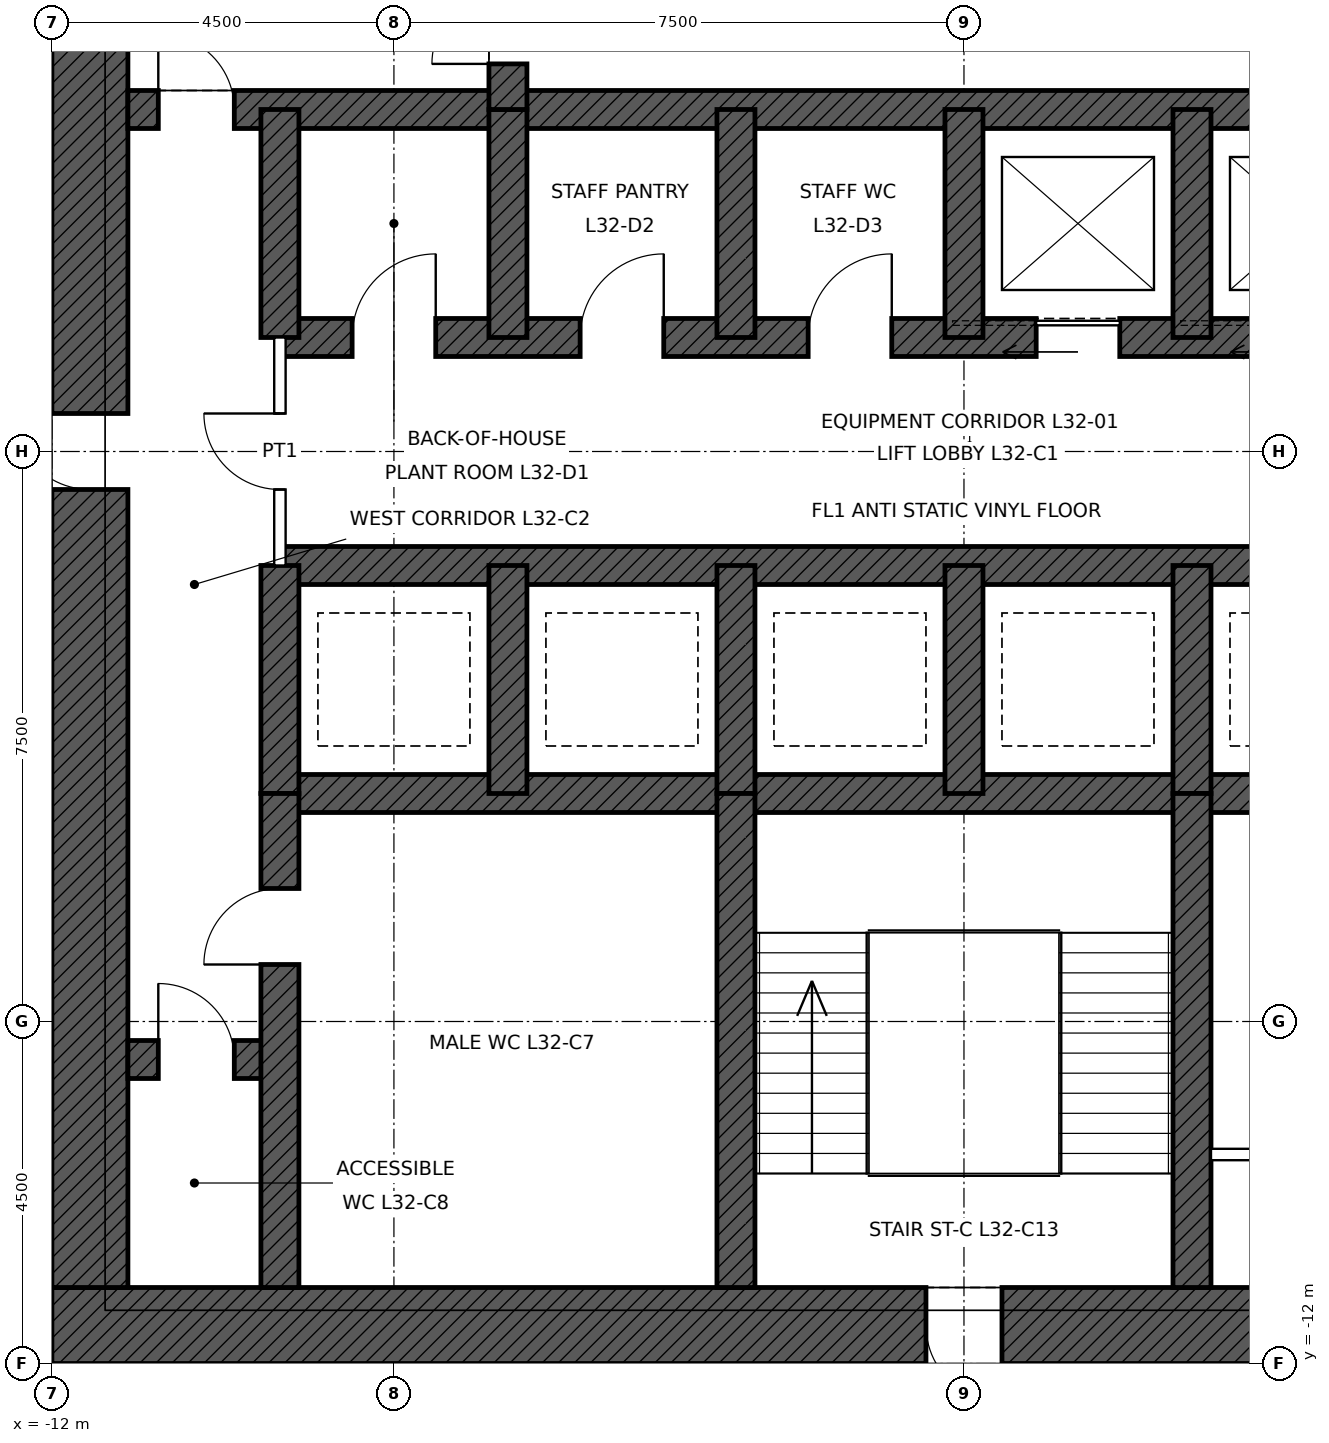
"""IFC4 building model, lengths in metres.
Left out: names, types, materials, properties, quantities, classifications, styles, units other than length and angle.
Written with IfcOpenShell. Run it as: python <this file> out.ifc"""

import sys

from ifc_helpers import new_model, si_unit, direction, frame, frame_2d, origin, place, context, subcontext, project, spatial, rectangle, extrude, element, fill, save


model = new_model("IFC4")
c1 = context("Model", 3, precision=1e-05, world=origin(), true_north=direction((0.0, 1.0)))
c2 = subcontext(c1, "Body", "Model", "MODEL_VIEW")
j1 = project(units=[si_unit("LENGTHUNIT", "METRE"), si_unit("PLANEANGLEUNIT", "RADIAN")], contexts=[c1])
p1 = place(None, origin())
s1 = spatial("IfcSite", under=j1, at=p1, CompositionType="ELEMENT")
p2 = place(p1, origin())
s2 = spatial("IfcBuilding", under=s1, at=p2, CompositionType="ELEMENT")
p3 = place(p2, frame((0.0, 0.0, 158.4)))
s3 = spatial("IfcBuildingStorey", under=s2, at=p3, CompositionType="ELEMENT", Elevation=158.4)
p4 = place(p3, frame((12.0, -11.5, 0.0), z_axis=(0.0, 0.0, 1.0), x_axis=(-1.0, 0.0, 0.0)))
e1 = element("IfcWall", 1, at=p4, inside=s3, PredefinedType="SHEAR", context=c2, shape_type="SweptSolid", body=[
    extrude(rectangle(XDim=24.0, YDim=1.0, at=frame_2d((12.0, 0.0))), origin(), (0.0, 0.0, 1.0), 4.5),
])
p5 = place(p4, frame((11.5, 0.0, 0.0)))
e2 = element("IfcOpeningElement", 2, at=p5, cuts=e1, PredefinedType="OPENING", context=c2, shape_type="SweptSolid", body=[
    extrude(rectangle(XDim=1.0, YDim=2.1, at=frame_2d((0.5, 1.05))), frame((0.0, 0.51, 0.0), z_axis=(0.0, -1.0, 0.0), x_axis=(1.0, 0.0, 0.0)), (0.0, 0.0, 1.0), 1.02),
])
p6 = place(p4, frame((1.0, 0.0, 0.0)))
e3 = element("IfcOpeningElement", 3, at=p6, cuts=e1, PredefinedType="OPENING", context=c2, shape_type="SweptSolid", body=[
    extrude(rectangle(XDim=1.0, YDim=2.4, at=frame_2d((0.5, 1.2))), frame((0.0, 0.51, 0.0), z_axis=(0.0, -1.0, 0.0), x_axis=(1.0, 0.0, 0.0)), (0.0, 0.0, 1.0), 1.02),
])
p7 = place(p3, frame((-11.5, -11.0, 0.0), z_axis=(0.0, 0.0, 1.0), x_axis=(0.0, 1.0, 0.0)))
e4 = element("IfcWall", 4, at=p7, inside=s3, PredefinedType="SHEAR", context=c2, shape_type="SweptSolid", body=[
    extrude(rectangle(XDim=22.0, YDim=1.0, at=frame_2d((11.0, 0.0))), origin(), (0.0, 0.0, 1.0), 4.5),
])
p8 = place(p7, frame((10.5, 0.0, 0.0)))
e5 = element("IfcOpeningElement", 5, at=p8, cuts=e4, PredefinedType="OPENING", context=c2, shape_type="SweptSolid", body=[
    extrude(rectangle(XDim=1.0, YDim=2.4, at=frame_2d((0.5, 1.2))), frame((0.0, 0.51, 0.0), z_axis=(0.0, -1.0, 0.0), x_axis=(1.0, 0.0, 0.0)), (0.0, 0.0, 1.0), 1.02),
])
p9 = place(p3, frame((-11.0, 4.5, 0.0), z_axis=(0.0, 0.0, 1.0), x_axis=(1.0, 0.0, 0.0)))
e6 = element("IfcWall", 6, at=p9, inside=s3, PredefinedType="SHEAR", context=c2, shape_type="SweptSolid", body=[
    extrude(rectangle(XDim=22.0, YDim=0.5, at=frame_2d((11.0, 0.0))), origin(), (0.0, 0.0, 1.0), 4.5),
])
p10 = place(p9, frame((0.4, 0.0, 0.0)))
e7 = element("IfcOpeningElement", 7, at=p10, cuts=e6, PredefinedType="OPENING", context=c2, shape_type="SweptSolid", body=[
    extrude(rectangle(XDim=1.0, YDim=2.1, at=frame_2d((0.5, 1.05))), frame((0.0, 0.26, 0.0), z_axis=(0.0, -1.0, 0.0), x_axis=(1.0, 0.0, 0.0)), (0.0, 0.0, 1.0), 0.52),
])
p11 = place(p9, frame((20.6, 0.0, 0.0)))
e8 = element("IfcOpeningElement", 8, at=p11, cuts=e6, PredefinedType="OPENING", context=c2, shape_type="SweptSolid", body=[
    extrude(rectangle(XDim=1.0, YDim=2.1, at=frame_2d((0.5, 1.05))), frame((0.0, 0.26, 0.0), z_axis=(0.0, -1.0, 0.0), x_axis=(1.0, 0.0, 0.0)), (0.0, 0.0, 1.0), 0.52),
])
p12 = place(p3, frame((-9.0, 1.5, 0.0), z_axis=(0.0, 0.0, 1.0), x_axis=(1.0, 0.0, 0.0)))
e9 = element("IfcWall", 9, at=p12, inside=s3, PredefinedType="SHEAR", context=c2, shape_type="SweptSolid", body=[
    extrude(rectangle(XDim=18.0, YDim=0.5, at=frame_2d((9.0, 0.0))), origin(), (0.0, 0.0, 1.0), 4.5),
])
p13 = place(p12, frame((9.95, 0.0, 0.0)))
e10 = element("IfcOpeningElement", 10, at=p13, cuts=e9, PredefinedType="OPENING", context=c2, shape_type="SweptSolid", body=[
    extrude(rectangle(XDim=1.1, YDim=2.1, at=frame_2d((0.55, 1.05))), frame((0.0, 0.26, 0.0), z_axis=(0.0, -1.0, 0.0), x_axis=(1.0, 0.0, 0.0)), (0.0, 0.0, 1.0), 0.52),
])
p14 = place(p12, frame((12.95, 0.0, 0.0)))
e11 = element("IfcOpeningElement", 11, at=p14, cuts=e9, PredefinedType="OPENING", context=c2, shape_type="SweptSolid", body=[
    extrude(rectangle(XDim=1.1, YDim=2.1, at=frame_2d((0.55, 1.05))), frame((0.0, 0.26, 0.0), z_axis=(0.0, -1.0, 0.0), x_axis=(1.0, 0.0, 0.0)), (0.0, 0.0, 1.0), 0.52),
])
p15 = place(p12, frame((15.95, 0.0, 0.0)))
e12 = element("IfcOpeningElement", 12, at=p15, cuts=e9, PredefinedType="OPENING", context=c2, shape_type="SweptSolid", body=[
    extrude(rectangle(XDim=1.1, YDim=2.1, at=frame_2d((0.55, 1.05))), frame((0.0, 0.26, 0.0), z_axis=(0.0, -1.0, 0.0), x_axis=(1.0, 0.0, 0.0)), (0.0, 0.0, 1.0), 0.52),
])
p16 = place(p12, frame((0.95, 0.0, 0.0)))
e13 = element("IfcOpeningElement", 13, at=p16, cuts=e9, PredefinedType="OPENING", context=c2, shape_type="SweptSolid", body=[
    extrude(rectangle(XDim=1.1, YDim=2.1, at=frame_2d((0.55, 1.05))), frame((0.0, 0.26, 0.0), z_axis=(0.0, -1.0, 0.0), x_axis=(1.0, 0.0, 0.0)), (0.0, 0.0, 1.0), 0.52),
])
p17 = place(p12, frame((3.95, 0.0, 0.0)))
e14 = element("IfcOpeningElement", 14, at=p17, cuts=e9, PredefinedType="OPENING", context=c2, shape_type="SweptSolid", body=[
    extrude(rectangle(XDim=1.1, YDim=2.1, at=frame_2d((0.55, 1.05))), frame((0.0, 0.26, 0.0), z_axis=(0.0, -1.0, 0.0), x_axis=(1.0, 0.0, 0.0)), (0.0, 0.0, 1.0), 0.52),
])
p18 = place(p12, frame((6.95, 0.0, 0.0)))
e15 = element("IfcOpeningElement", 15, at=p18, cuts=e9, PredefinedType="OPENING", context=c2, shape_type="SweptSolid", body=[
    extrude(rectangle(XDim=1.1, YDim=2.1, at=frame_2d((0.55, 1.05))), frame((0.0, 0.26, 0.0), z_axis=(0.0, -1.0, 0.0), x_axis=(1.0, 0.0, 0.0)), (0.0, 0.0, 1.0), 0.52),
])
for number, where, z_axis, x_axis in (
    (16, (-9.0, -1.5, 0.0), (0.0, 0.0, 1.0), (1.0, 0.0, 0.0)),
    (17, (-9.0, -4.5, 0.0), (0.0, 0.0, 1.0), (1.0, 0.0, 0.0)),
):
    element("IfcWall", number, at=place(p3, frame(where, z_axis=z_axis, x_axis=x_axis)), inside=s3, PredefinedType="SHEAR", context=c2, shape_type="SweptSolid", body=[
        extrude(rectangle(XDim=18.0, YDim=0.5, at=frame_2d((9.0, 0.0))), origin(), (0.0, 0.0, 1.0), 4.5),
    ])
p19 = place(p3, frame((-11.0, -8.0, 0.0), z_axis=(0.0, 0.0, 1.0), x_axis=(1.0, 0.0, 0.0)))
e18 = element("IfcWall", 18, at=p19, inside=s3, PredefinedType="SHEAR", context=c2, shape_type="SweptSolid", body=[
    extrude(rectangle(XDim=2.0, YDim=0.5, at=frame_2d((1.0, 0.0))), origin(), (0.0, 0.0, 1.0), 4.5),
])
p20 = place(p19, frame((0.4, 0.0, 0.0)))
e19 = element("IfcOpeningElement", 19, at=p20, cuts=e18, PredefinedType="OPENING", context=c2, shape_type="SweptSolid", body=[
    extrude(rectangle(XDim=1.0, YDim=2.1, at=frame_2d((0.5, 1.05))), frame((0.0, 0.26, 0.0), z_axis=(0.0, -1.0, 0.0), x_axis=(1.0, 0.0, 0.0)), (0.0, 0.0, 1.0), 0.52),
])
for number, where, z_axis, x_axis in (
    (20, (-9.0, 1.5, 0.0), (0.0, 0.0, 1.0), (0.0, 1.0, 0.0)),
    (21, (-9.0, -4.5, 0.0), (0.0, 0.0, 1.0), (0.0, 1.0, 0.0)),
    (22, (-6.0, 1.5, 0.0), (0.0, 0.0, 1.0), (0.0, 1.0, 0.0)),
    (23, (-3.0, 1.5, 0.0), (0.0, 0.0, 1.0), (0.0, 1.0, 0.0)),
    (24, (0.0, 1.5, 0.0), (0.0, 0.0, 1.0), (0.0, 1.0, 0.0)),
    (25, (3.0, 1.5, 0.0), (0.0, 0.0, 1.0), (0.0, 1.0, 0.0)),
    (26, (-6.0, -4.5, 0.0), (0.0, 0.0, 1.0), (0.0, 1.0, 0.0)),
    (27, (-3.0, -4.5, 0.0), (0.0, 0.0, 1.0), (0.0, 1.0, 0.0)),
    (28, (0.0, -4.5, 0.0), (0.0, 0.0, 1.0), (0.0, 1.0, 0.0)),
    (29, (3.0, -4.5, 0.0), (0.0, 0.0, 1.0), (0.0, 1.0, 0.0)),
):
    element("IfcWall", number, at=place(p3, frame(where, z_axis=z_axis, x_axis=x_axis)), inside=s3, PredefinedType="SHEAR", context=c2, shape_type="SweptSolid", body=[
        extrude(rectangle(XDim=3.0, YDim=0.5, at=frame_2d((1.5, 0.0))), origin(), (0.0, 0.0, 1.0), 4.5),
    ])
p21 = place(p3, frame((-6.0, 4.5, 0.0), z_axis=(0.0, 0.0, 1.0), x_axis=(0.0, 1.0, 0.0)))
e30 = element("IfcWall", 30, at=p21, inside=s3, PredefinedType="SHEAR", context=c2, shape_type="SweptSolid", body=[
    extrude(rectangle(XDim=6.5, YDim=0.5, at=frame_2d((3.25, 0.0))), origin(), (0.0, 0.0, 1.0), 4.5),
])
p22 = place(p21, frame((0.6, 0.0, 0.0)))
e31 = element("IfcOpeningElement", 31, at=p22, cuts=e30, PredefinedType="OPENING", context=c2, shape_type="SweptSolid", body=[
    extrude(rectangle(XDim=1.0, YDim=2.1, at=frame_2d((0.5, 1.05))), frame((0.0, 0.26, 0.0), z_axis=(0.0, -1.0, 0.0), x_axis=(1.0, 0.0, 0.0)), (0.0, 0.0, 1.0), 0.52),
])
p23 = place(p3, frame((-9.0, -11.0, 0.0), z_axis=(0.0, 0.0, 1.0), x_axis=(0.0, 1.0, 0.0)))
e32 = element("IfcWall", 32, at=p23, inside=s3, PredefinedType="SHEAR", context=c2, shape_type="SweptSolid", body=[
    extrude(rectangle(XDim=6.5, YDim=0.5, at=frame_2d((3.25, 0.0))), origin(), (0.0, 0.0, 1.0), 4.5),
])
p24 = place(p23, frame((4.25, 0.0, 0.0)))
e33 = element("IfcOpeningElement", 33, at=p24, cuts=e32, PredefinedType="OPENING", context=c2, shape_type="SweptSolid", body=[
    extrude(rectangle(XDim=1.0, YDim=2.1, at=frame_2d((0.5, 1.05))), frame((0.0, 0.26, 0.0), z_axis=(0.0, -1.0, 0.0), x_axis=(1.0, 0.0, 0.0)), (0.0, 0.0, 1.0), 0.52),
])
for number, where, z_axis, x_axis in (
    (34, (-3.0, -11.0, 0.0), (0.0, 0.0, 1.0), (0.0, 1.0, 0.0)),
    (35, (3.0, -11.0, 0.0), (0.0, 0.0, 1.0), (0.0, 1.0, 0.0)),
):
    element("IfcWall", number, at=place(p3, frame(where, z_axis=z_axis, x_axis=x_axis)), inside=s3, PredefinedType="SHEAR", context=c2, shape_type="SweptSolid", body=[
        extrude(rectangle(XDim=6.5, YDim=0.5, at=frame_2d((3.25, 0.0))), origin(), (0.0, 0.0, 1.0), 4.5),
    ])
p25 = place(p3, frame((3.25, -9.25, 0.0), z_axis=(0.0, 0.0, 1.0), x_axis=(1.0, 0.0, 0.0)))
e36 = element("IfcWall", 36, at=p25, inside=s3, PredefinedType="PARTITIONING", context=c2, shape_type="SweptSolid", body=[
    extrude(rectangle(XDim=5.5, YDim=0.15, at=frame_2d((2.75, 0.0))), origin(), (0.0, 0.0, 1.0), 4.25),
])
p26 = place(p25, frame((2.25, 0.0, 0.0)))
e37 = element("IfcOpeningElement", 37, at=p26, cuts=e36, PredefinedType="OPENING", context=c2, shape_type="SweptSolid", body=[
    extrude(rectangle(XDim=1.0, YDim=2.1, at=frame_2d((0.5, 1.05))), frame((0.0, 0.085, 0.0), z_axis=(0.0, -1.0, 0.0), x_axis=(1.0, 0.0, 0.0)), (0.0, 0.0, 1.0), 0.17),
])
p27 = place(p3, frame((-9.0, -1.5, 0.0), z_axis=(0.0, 0.0, 1.0), x_axis=(0.0, 1.0, 0.0)))
e38 = element("IfcWall", 38, at=p27, inside=s3, PredefinedType="PARTITIONING", context=c2, shape_type="SweptSolid", body=[
    extrude(rectangle(XDim=3.0, YDim=0.15, at=frame_2d((1.5, 0.0))), origin(), (0.0, 0.0, 1.0), 4.25),
])
p28 = place(p27, frame((1.0, 0.0, 0.0)))
e39 = element("IfcOpeningElement", 39, at=p28, cuts=e38, PredefinedType="OPENING", context=c2, shape_type="SweptSolid", body=[
    extrude(rectangle(XDim=1.0, YDim=2.4, at=frame_2d((0.5, 1.2))), frame((0.0, 0.085, 0.0), z_axis=(0.0, -1.0, 0.0), x_axis=(1.0, 0.0, 0.0)), (0.0, 0.0, 1.0), 0.17),
])
p29 = place(p10, origin())
e40 = element("IfcDoor", 40, at=p29, inside=s3, OperationType="SINGLE_SWING_LEFT", PredefinedType="DOOR", context=c2, shape_type="SweptSolid", body=[
    extrude(rectangle(XDim=1.0, YDim=2.1, at=frame_2d((0.5, 1.05))), frame((0.0, 0.025, 0.0), z_axis=(0.0, -1.0, 0.0), x_axis=(1.0, 0.0, 0.0)), (0.0, 0.0, 1.0), 0.05),
])
fill(e7, e40)
p30 = place(p22, origin())
e41 = element("IfcDoor", 41, at=p30, inside=s3, OperationType="SINGLE_SWING_LEFT", PredefinedType="DOOR", context=c2, shape_type="SweptSolid", body=[
    extrude(rectangle(XDim=1.0, YDim=2.1, at=frame_2d((0.5, 1.05))), frame((0.0, 0.025, 0.0), z_axis=(0.0, -1.0, 0.0), x_axis=(1.0, 0.0, 0.0)), (0.0, 0.0, 1.0), 0.05),
])
fill(e31, e41)
p31 = place(p5, origin())
e42 = element("IfcDoor", 42, at=p31, inside=s3, OperationType="SINGLE_SWING_LEFT", PredefinedType="DOOR", context=c2, shape_type="SweptSolid", body=[
    extrude(rectangle(XDim=1.0, YDim=2.1, at=frame_2d((0.5, 1.05))), frame((0.0, 0.485, 0.0), z_axis=(0.0, -1.0, 0.0), x_axis=(1.0, 0.0, 0.0)), (0.0, 0.0, 1.0), 0.05),
])
fill(e2, e42)
p32 = place(p8, origin())
e43 = element("IfcDoor", 43, at=p32, inside=s3, OperationType="SINGLE_SWING_RIGHT", PredefinedType="DOOR", context=c2, shape_type="SweptSolid", body=[
    extrude(rectangle(XDim=1.0, YDim=2.4, at=frame_2d((0.5, 1.2))), frame((0.0, 0.485, 0.0), z_axis=(0.0, -1.0, 0.0), x_axis=(1.0, 0.0, 0.0)), (0.0, 0.0, 1.0), 0.05),
])
fill(e5, e43)
p33 = place(p24, origin())
e44 = element("IfcDoor", 44, at=p33, inside=s3, OperationType="SINGLE_SWING_LEFT", PredefinedType="DOOR", context=c2, shape_type="SweptSolid", body=[
    extrude(rectangle(XDim=1.0, YDim=2.1, at=frame_2d((0.5, 1.05))), frame((0.0, 0.025, 0.0), z_axis=(0.0, -1.0, 0.0), x_axis=(1.0, 0.0, 0.0)), (0.0, 0.0, 1.0), 0.05),
])
fill(e33, e44)
p34 = place(p20, origin())
e45 = element("IfcDoor", 45, at=p34, inside=s3, OperationType="SINGLE_SWING_LEFT", PredefinedType="DOOR", context=c2, shape_type="SweptSolid", body=[
    extrude(rectangle(XDim=1.0, YDim=2.1, at=frame_2d((0.5, 1.05))), frame((0.0, 0.025, 0.0), z_axis=(0.0, -1.0, 0.0), x_axis=(1.0, 0.0, 0.0)), (0.0, 0.0, 1.0), 0.05),
])
fill(e19, e45)
p35 = place(p13, origin())
e46 = element("IfcDoor", 46, at=p35, inside=s3, OperationType="SLIDING_TO_LEFT", PredefinedType="DOOR", context=c2, shape_type="SweptSolid", body=[
    extrude(rectangle(XDim=1.1, YDim=2.1, at=frame_2d((0.55, 1.05))), frame((0.0, 0.025, 0.0), z_axis=(0.0, -1.0, 0.0), x_axis=(1.0, 0.0, 0.0)), (0.0, 0.0, 1.0), 0.05),
])
fill(e10, e46)
p36 = place(p28, origin())
e47 = element("IfcDoor", 47, at=p36, inside=s3, OperationType="SINGLE_SWING_RIGHT", PredefinedType="DOOR", context=c2, shape_type="SweptSolid", body=[
    extrude(rectangle(XDim=1.0, YDim=2.4, at=frame_2d((0.5, 1.2))), frame((0.0, 0.025, 0.0), z_axis=(0.0, -1.0, 0.0), x_axis=(1.0, 0.0, 0.0)), (0.0, 0.0, 1.0), 0.05),
])
fill(e39, e47)
p37 = place(p16, origin())
e48 = element("IfcDoor", 48, at=p37, inside=s3, OperationType="SINGLE_SWING_RIGHT", PredefinedType="DOOR", context=c2, shape_type="SweptSolid", body=[
    extrude(rectangle(XDim=1.1, YDim=2.1, at=frame_2d((0.55, 1.05))), frame((0.0, 0.025, 0.0), z_axis=(0.0, -1.0, 0.0), x_axis=(1.0, 0.0, 0.0)), (0.0, 0.0, 1.0), 0.05),
])
fill(e13, e48)
p38 = place(p17, origin())
e49 = element("IfcDoor", 49, at=p38, inside=s3, OperationType="SINGLE_SWING_RIGHT", PredefinedType="DOOR", context=c2, shape_type="SweptSolid", body=[
    extrude(rectangle(XDim=1.1, YDim=2.1, at=frame_2d((0.55, 1.05))), frame((0.0, 0.025, 0.0), z_axis=(0.0, -1.0, 0.0), x_axis=(1.0, 0.0, 0.0)), (0.0, 0.0, 1.0), 0.05),
])
fill(e14, e49)
p39 = place(p18, origin())
e50 = element("IfcDoor", 50, at=p39, inside=s3, OperationType="SINGLE_SWING_RIGHT", PredefinedType="DOOR", context=c2, shape_type="SweptSolid", body=[
    extrude(rectangle(XDim=1.1, YDim=2.1, at=frame_2d((0.55, 1.05))), frame((0.0, 0.025, 0.0), z_axis=(0.0, -1.0, 0.0), x_axis=(1.0, 0.0, 0.0)), (0.0, 0.0, 1.0), 0.05),
])
fill(e15, e50)
save(model, sys.argv[1])
